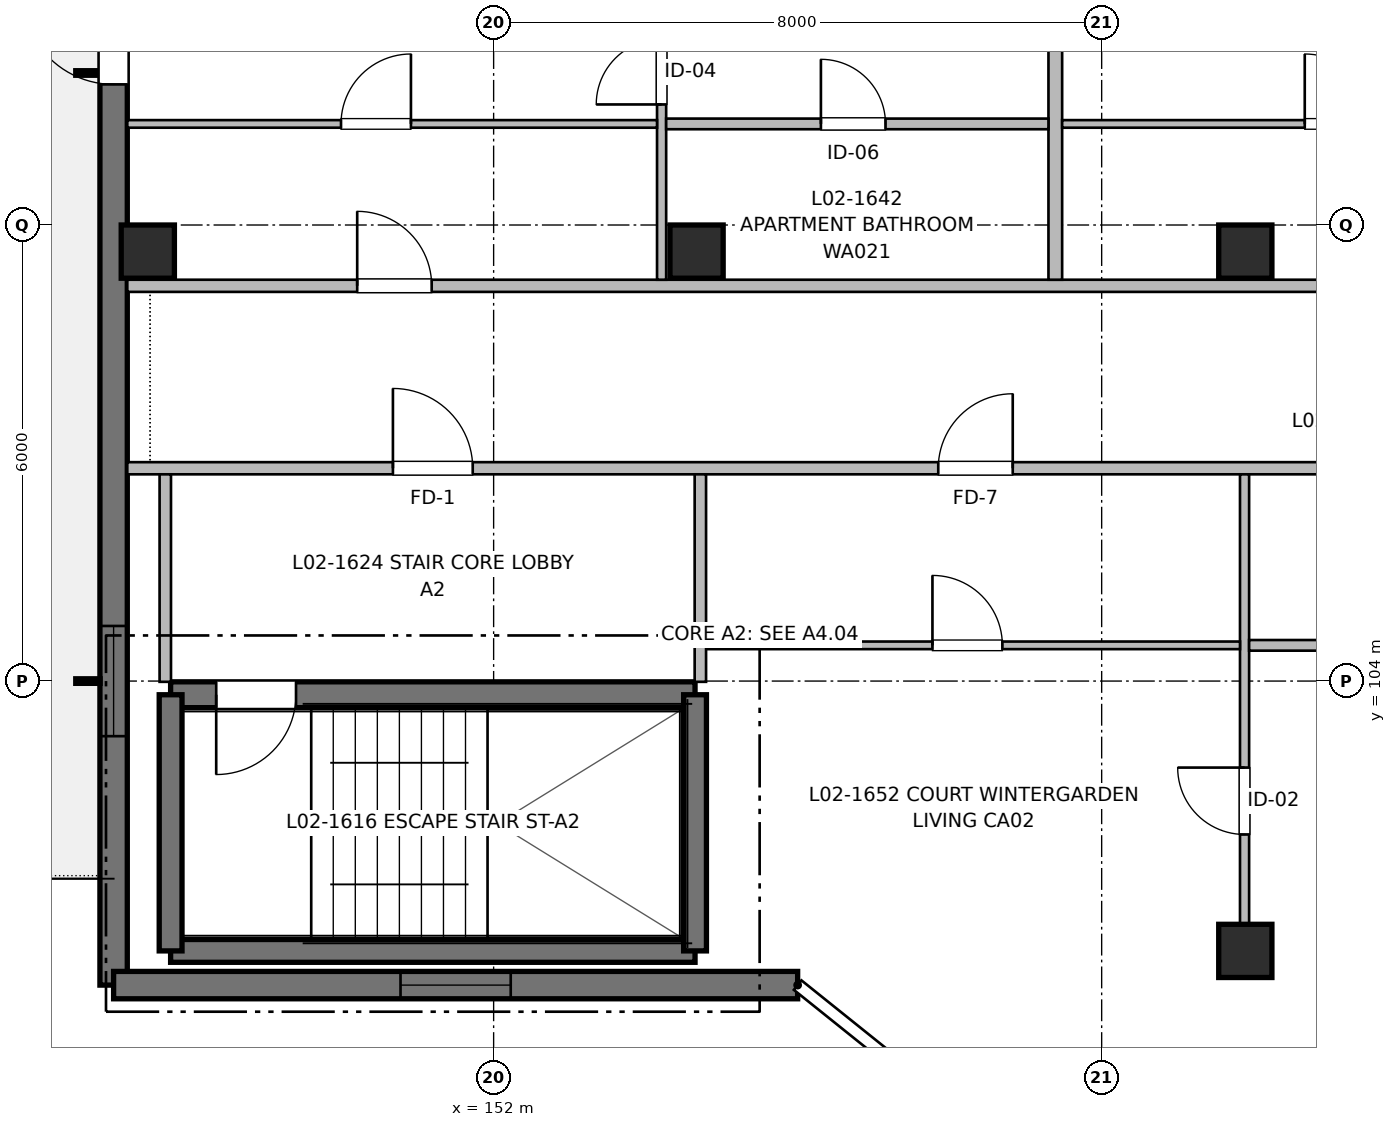
"""IFC4 building model, lengths in metres.
Left out: names, types, materials, properties, quantities, classifications, styles, units other than length and angle.
Written with IfcOpenShell. Run it as: python <this file> out.ifc"""

import sys

from ifc_helpers import new_model, si_unit, direction, frame, frame_2d, origin, origin_2d, place, context, subcontext, project, spatial, rectangle, extrude, element, fill, save


model = new_model("IFC4")
c1 = context("Model", 3, precision=1e-05, world=origin(), true_north=direction((0.0, 1.0)))
c2 = subcontext(c1, "Body", "Model", "MODEL_VIEW")
j1 = project(units=[si_unit("LENGTHUNIT", "METRE"), si_unit("PLANEANGLEUNIT", "RADIAN")], contexts=[c1])
p1 = place(None, origin())
s1 = spatial("IfcSite", under=j1, at=p1, CompositionType="ELEMENT")
p2 = place(p1, origin())
s2 = spatial("IfcBuilding", under=s1, at=p2, CompositionType="ELEMENT")
p3 = place(p2, frame((0.0, 0.0, 7.36)))
s3 = spatial("IfcBuildingStorey", under=s2, at=p3, CompositionType="ELEMENT", Elevation=7.36)
for number, where, z_axis, x_axis in (
    (1, (147.45, 109.65, 0.0), (0.0, 0.0, 1.0), (1.0, 0.0, 0.0)),
    (2, (154.67, 109.65, 0.0), (0.0, 0.0, 1.0), (1.0, 0.0, 0.0)),
    (3, (161.89, 100.45, 0.0), (0.0, 0.0, 1.0), (1.0, 0.0, 0.0)),
    (4, (161.89, 109.65, 0.0), (0.0, 0.0, 1.0), (1.0, 0.0, 0.0)),
):
    element("IfcColumn", number, at=place(p3, frame(where, z_axis=z_axis, x_axis=x_axis)), inside=s3, PredefinedType="COLUMN", context=c2, shape_type="SweptSolid", body=[
        extrude(rectangle(XDim=0.7, YDim=0.7, at=origin_2d()), origin(), (0.0, 0.0, 1.0), 3.2),
    ])
p4 = place(p3, frame((147.75, 100.45, 0.0), z_axis=(0.0, 0.0, 1.0), x_axis=(1.0, 0.0, 0.0)))
e5 = element("IfcWall", 5, at=p4, inside=s3, PredefinedType="SHEAR", context=c2, shape_type="SweptSolid", body=[
    extrude(rectangle(XDim=6.9, YDim=0.3, at=frame_2d((3.45, 0.0))), origin(), (0.0, 0.0, 1.0), 3.2),
])
p5 = place(p3, frame((154.65, 103.82, 0.0), z_axis=(0.0, 0.0, 1.0), x_axis=(-1.0, 0.0, 0.0)))
e6 = element("IfcWall", 6, at=p5, inside=s3, PredefinedType="SHEAR", context=c2, shape_type="SweptSolid", body=[
    extrude(rectangle(XDim=6.9, YDim=0.34, at=frame_2d((3.45, 0.0))), origin(), (0.0, 0.0, 1.0), 3.2),
])
p6 = place(p5, frame((5.25, 0.0, 0.0)))
e7 = element("IfcOpeningElement", 7, at=p6, cuts=e6, PredefinedType="OPENING", context=c2, shape_type="SweptSolid", body=[
    extrude(rectangle(XDim=1.05, YDim=2.15, at=frame_2d((0.525, 1.075))), frame((0.0, 0.18, 0.0), z_axis=(0.0, -1.0, 0.0), x_axis=(1.0, 0.0, 0.0)), (0.0, 0.0, 1.0), 0.36),
])
for number, where, z_axis, x_axis in (
    (8, (147.75, 103.82, 0.0), (0.0, 0.0, 1.0), (0.0, -1.0, 0.0)),
    (9, (154.65, 100.45, 0.0), (0.0, 0.0, 1.0), (0.0, 1.0, 0.0)),
):
    element("IfcWall", number, at=place(p3, frame(where, z_axis=z_axis, x_axis=x_axis)), inside=s3, PredefinedType="SHEAR", context=c2, shape_type="SweptSolid", body=[
        extrude(rectangle(XDim=3.37, YDim=0.3, at=frame_2d((1.685, 0.0))), origin(), (0.0, 0.0, 1.0), 3.2),
    ])
p7 = place(p3, frame((147.0, 100.0, 0.0), z_axis=(0.0, 0.0, 1.0), x_axis=(0.0, 1.0, 0.0)))
e10 = element("IfcWall", 10, at=p7, inside=s3, PredefinedType="SHEAR", context=c2, shape_type="SweptSolid", body=[
    extrude(rectangle(XDim=16.0, YDim=0.36, at=frame_2d((8.0, 0.0))), origin(), (0.0, 0.0, 1.0), 2.98),
])
p8 = place(p7, frame((3.275, 0.0, 0.77)))
e11 = element("IfcOpeningElement", 11, at=p8, cuts=e10, PredefinedType="OPENING", context=c2, shape_type="SweptSolid", body=[
    extrude(rectangle(XDim=1.45, YDim=1.45, at=frame_2d((0.725, 0.725))), frame((0.0, 0.19, 0.0), z_axis=(0.0, -1.0, 0.0), x_axis=(1.0, 0.0, 0.0)), (0.0, 0.0, 1.0), 0.38),
])
p9 = place(p7, frame((11.85, 0.0, 0.0)))
e12 = element("IfcOpeningElement", 12, at=p9, cuts=e10, PredefinedType="OPENING", context=c2, shape_type="SweptSolid", body=[
    extrude(rectangle(XDim=1.2, YDim=2.2, at=frame_2d((0.6, 1.1))), frame((0.0, 0.19, 0.0), z_axis=(0.0, -1.0, 0.0), x_axis=(1.0, 0.0, 0.0)), (0.0, 0.0, 1.0), 0.38),
])
p10 = place(p7, frame((13.3, 0.0, 0.82)))
e13 = element("IfcOpeningElement", 13, at=p10, cuts=e10, PredefinedType="OPENING", context=c2, shape_type="SweptSolid", body=[
    extrude(rectangle(XDim=1.5, YDim=1.4, at=frame_2d((0.75, 0.7))), frame((0.0, 0.19, 0.0), z_axis=(0.0, -1.0, 0.0), x_axis=(1.0, 0.0, 0.0)), (0.0, 0.0, 1.0), 0.38),
])
p11 = place(p3, frame((156.0, 100.0, 0.0), z_axis=(0.0, 0.0, 1.0), x_axis=(-1.0, 0.0, 0.0)))
e14 = element("IfcWall", 14, at=p11, inside=s3, PredefinedType="SHEAR", context=c2, shape_type="SweptSolid", body=[
    extrude(rectangle(XDim=9.0, YDim=0.36, at=frame_2d((4.5, 0.0))), origin(), (0.0, 0.0, 1.0), 2.98),
])
p12 = place(p11, frame((3.775, 0.0, 0.77)))
e15 = element("IfcOpeningElement", 15, at=p12, cuts=e14, PredefinedType="OPENING", context=c2, shape_type="SweptSolid", body=[
    extrude(rectangle(XDim=1.45, YDim=1.45, at=frame_2d((0.725, 0.725))), frame((0.0, 0.19, 0.0), z_axis=(0.0, -1.0, 0.0), x_axis=(1.0, 0.0, 0.0)), (0.0, 0.0, 1.0), 0.38),
])
p13 = place(p3, frame((147.18, 106.8, 0.0), z_axis=(0.0, 0.0, 1.0), x_axis=(1.0, 0.0, 0.0)))
e16 = element("IfcWall", 16, at=p13, inside=s3, PredefinedType="PARTITIONING", context=c2, shape_type="SweptSolid", body=[
    extrude(rectangle(XDim=27.62, YDim=0.16, at=frame_2d((13.81, 0.0))), origin(), (0.0, 0.0, 1.0), 2.935),
])
p14 = place(p13, frame((3.495, 0.0, 0.0)))
e17 = element("IfcOpeningElement", 17, at=p14, cuts=e16, PredefinedType="OPENING", context=c2, shape_type="SweptSolid", body=[
    extrude(rectangle(XDim=1.05, YDim=2.15, at=frame_2d((0.525, 1.075))), frame((0.0, 0.09, 0.0), z_axis=(0.0, -1.0, 0.0), x_axis=(1.0, 0.0, 0.0)), (0.0, 0.0, 1.0), 0.18),
])
p15 = place(p13, frame((10.67, 0.0, 0.0)))
e18 = element("IfcOpeningElement", 18, at=p15, cuts=e16, PredefinedType="OPENING", context=c2, shape_type="SweptSolid", body=[
    extrude(rectangle(XDim=0.98, YDim=2.15, at=frame_2d((0.49, 1.075))), frame((0.0, 0.09, 0.0), z_axis=(0.0, -1.0, 0.0), x_axis=(1.0, 0.0, 0.0)), (0.0, 0.0, 1.0), 0.18),
])
p16 = place(p3, frame((147.18, 109.2, 0.0), z_axis=(0.0, 0.0, 1.0), x_axis=(1.0, 0.0, 0.0)))
e19 = element("IfcWall", 19, at=p16, inside=s3, PredefinedType="PARTITIONING", context=c2, shape_type="SweptSolid", body=[
    extrude(rectangle(XDim=36.64, YDim=0.16, at=frame_2d((18.32, 0.0))), origin(), (0.0, 0.0, 1.0), 2.935),
])
p17 = place(p16, frame((3.025, 0.0, 0.0)))
e20 = element("IfcOpeningElement", 20, at=p17, cuts=e19, PredefinedType="OPENING", context=c2, shape_type="SweptSolid", body=[
    extrude(rectangle(XDim=0.98, YDim=2.15, at=frame_2d((0.49, 1.075))), frame((0.0, 0.09, 0.0), z_axis=(0.0, -1.0, 0.0), x_axis=(1.0, 0.0, 0.0)), (0.0, 0.0, 1.0), 0.18),
])
p18 = place(p16, frame((15.7, 0.0, 0.0)))
e21 = element("IfcOpeningElement", 21, at=p18, cuts=e19, PredefinedType="OPENING", context=c2, shape_type="SweptSolid", body=[
    extrude(rectangle(XDim=0.98, YDim=2.15, at=frame_2d((0.49, 1.075))), frame((0.0, 0.09, 0.0), z_axis=(0.0, -1.0, 0.0), x_axis=(1.0, 0.0, 0.0)), (0.0, 0.0, 1.0), 0.18),
])
p19 = place(p16, frame((27.145, 0.0, 0.0)))
e22 = element("IfcOpeningElement", 22, at=p19, cuts=e19, PredefinedType="OPENING", context=c2, shape_type="SweptSolid", body=[
    extrude(rectangle(XDim=0.98, YDim=2.15, at=frame_2d((0.49, 1.075))), frame((0.0, 0.09, 0.0), z_axis=(0.0, -1.0, 0.0), x_axis=(1.0, 0.0, 0.0)), (0.0, 0.0, 1.0), 0.18),
])
for number, where, z_axis, x_axis in (
    (23, (147.68, 103.99, 0.0), (0.0, 0.0, 1.0), (0.0, 1.0, 0.0)),
    (24, (154.72, 103.99, 0.0), (0.0, 0.0, 1.0), (0.0, 1.0, 0.0)),
):
    element("IfcWall", number, at=place(p3, frame(where, z_axis=z_axis, x_axis=x_axis)), inside=s3, PredefinedType="PARTITIONING", context=c2, shape_type="SweptSolid", body=[
        extrude(rectangle(XDim=2.73, YDim=0.15, at=frame_2d((1.365, 0.0))), origin(), (0.0, 0.0, 1.0), 2.935),
    ])
p20 = place(p3, frame((159.39, 109.28, 0.0), z_axis=(0.0, 0.0, 1.0), x_axis=(0.0, 1.0, 0.0)))
e25 = element("IfcWall", 25, at=p20, inside=s3, PredefinedType="PARTITIONING", context=c2, shape_type="SweptSolid", body=[
    extrude(rectangle(XDim=6.6, YDim=0.18, at=frame_2d((3.3, 0.0))), origin(), (0.0, 0.0, 1.0), 2.935),
])
p21 = place(p3, frame((154.21, 109.28, 0.0), z_axis=(0.0, 0.0, 1.0), x_axis=(0.0, 1.0, 0.0)))
e26 = element("IfcWall", 26, at=p21, inside=s3, PredefinedType="PARTITIONING", context=c2, shape_type="SweptSolid", body=[
    extrude(rectangle(XDim=6.6, YDim=0.12, at=frame_2d((3.3, 0.0))), origin(), (0.0, 0.0, 1.0), 2.935),
])
p22 = place(p21, frame((2.306, 0.0, 0.0)))
e27 = element("IfcOpeningElement", 27, at=p22, cuts=e26, PredefinedType="OPENING", context=c2, shape_type="SweptSolid", body=[
    extrude(rectangle(XDim=0.86, YDim=2.1, at=frame_2d((0.43, 1.05))), frame((0.0, 0.07, 0.0), z_axis=(0.0, -1.0, 0.0), x_axis=(1.0, 0.0, 0.0)), (0.0, 0.0, 1.0), 0.14),
])
p23 = place(p21, frame((4.097, 0.0, 0.0)))
e28 = element("IfcOpeningElement", 28, at=p23, cuts=e26, PredefinedType="OPENING", context=c2, shape_type="SweptSolid", body=[
    extrude(rectangle(XDim=0.9, YDim=2.1, at=frame_2d((0.45, 1.05))), frame((0.0, 0.07, 0.0), z_axis=(0.0, -1.0, 0.0), x_axis=(1.0, 0.0, 0.0)), (0.0, 0.0, 1.0), 0.14),
])
p24 = place(p3, frame((154.27, 111.33, 0.0), z_axis=(0.0, 0.0, 1.0), x_axis=(1.0, 0.0, 0.0)))
e29 = element("IfcWall", 29, at=p24, inside=s3, PredefinedType="PARTITIONING", context=c2, shape_type="SweptSolid", body=[
    extrude(rectangle(XDim=5.03, YDim=0.14, at=frame_2d((2.515, 0.0))), origin(), (0.0, 0.0, 1.0), 2.935),
])
p25 = place(p24, frame((2.036, 0.0, 0.0)))
e30 = element("IfcOpeningElement", 30, at=p25, cuts=e29, PredefinedType="OPENING", context=c2, shape_type="SweptSolid", body=[
    extrude(rectangle(XDim=0.85, YDim=2.05, at=frame_2d((0.425, 1.025))), frame((0.0, 0.08, 0.0), z_axis=(0.0, -1.0, 0.0), x_axis=(1.0, 0.0, 0.0)), (0.0, 0.0, 1.0), 0.16),
])
p26 = place(p3, frame((147.18, 111.33, 0.0), z_axis=(0.0, 0.0, 1.0), x_axis=(1.0, 0.0, 0.0)))
e31 = element("IfcWall", 31, at=p26, inside=s3, PredefinedType="PARTITIONING", context=c2, shape_type="SweptSolid", body=[
    extrude(rectangle(XDim=6.97, YDim=0.1, at=frame_2d((3.485, 0.0))), origin(), (0.0, 0.0, 1.0), 2.935),
])
p27 = place(p26, frame((2.812, 0.0, 0.0)))
e32 = element("IfcOpeningElement", 32, at=p27, cuts=e31, PredefinedType="OPENING", context=c2, shape_type="SweptSolid", body=[
    extrude(rectangle(XDim=0.92, YDim=2.1, at=frame_2d((0.46, 1.05))), frame((0.0, 0.06, 0.0), z_axis=(0.0, -1.0, 0.0), x_axis=(1.0, 0.0, 0.0)), (0.0, 0.0, 1.0), 0.12),
])
p28 = place(p3, frame((159.48, 111.33, 0.0), z_axis=(0.0, 0.0, 1.0), x_axis=(1.0, 0.0, 0.0)))
e33 = element("IfcWall", 33, at=p28, inside=s3, PredefinedType="PARTITIONING", context=c2, shape_type="SweptSolid", body=[
    extrude(rectangle(XDim=6.92, YDim=0.1, at=frame_2d((3.46, 0.0))), origin(), (0.0, 0.0, 1.0), 2.935),
])
p29 = place(p28, frame((3.192, 0.0, 0.0)))
e34 = element("IfcOpeningElement", 34, at=p29, cuts=e33, PredefinedType="OPENING", context=c2, shape_type="SweptSolid", body=[
    extrude(rectangle(XDim=0.92, YDim=2.1, at=frame_2d((0.46, 1.05))), frame((0.0, 0.06, 0.0), z_axis=(0.0, -1.0, 0.0), x_axis=(1.0, 0.0, 0.0)), (0.0, 0.0, 1.0), 0.12),
])
p30 = place(p3, frame((161.88, 100.18, 0.0), z_axis=(0.0, 0.0, 1.0), x_axis=(0.0, 1.0, 0.0)))
e35 = element("IfcWall", 35, at=p30, inside=s3, PredefinedType="PARTITIONING", context=c2, shape_type="SweptSolid", body=[
    extrude(rectangle(XDim=6.54, YDim=0.12, at=frame_2d((3.27, 0.0))), origin(), (0.0, 0.0, 1.0), 2.68),
])
p31 = place(p30, frame((1.802, 0.0, 0.0)))
e36 = element("IfcOpeningElement", 36, at=p31, cuts=e35, PredefinedType="OPENING", context=c2, shape_type="SweptSolid", body=[
    extrude(rectangle(XDim=0.88, YDim=2.1, at=frame_2d((0.44, 1.05))), frame((0.0, 0.07, 0.0), z_axis=(0.0, -1.0, 0.0), x_axis=(1.0, 0.0, 0.0)), (0.0, 0.0, 1.0), 0.14),
])
p32 = place(p3, frame((161.94, 104.47, 0.0), z_axis=(0.0, 0.0, 1.0), x_axis=(1.0, 0.0, 0.0)))
e37 = element("IfcWall", 37, at=p32, inside=s3, PredefinedType="PARTITIONING", context=c2, shape_type="SweptSolid", body=[
    extrude(rectangle(XDim=5.97, YDim=0.14, at=frame_2d((2.985, 0.0))), origin(), (0.0, 0.0, 1.0), 2.935),
])
p33 = place(p32, frame((2.533, 0.0, 0.0)))
e38 = element("IfcOpeningElement", 38, at=p33, cuts=e37, PredefinedType="OPENING", context=c2, shape_type="SweptSolid", body=[
    extrude(rectangle(XDim=0.86, YDim=2.1, at=frame_2d((0.43, 1.05))), frame((0.0, 0.08, 0.0), z_axis=(0.0, -1.0, 0.0), x_axis=(1.0, 0.0, 0.0)), (0.0, 0.0, 1.0), 0.16),
])
p34 = place(p3, frame((154.8, 104.47, 0.0), z_axis=(0.0, 0.0, 1.0), x_axis=(1.0, 0.0, 0.0)))
e39 = element("IfcWall", 39, at=p34, inside=s3, PredefinedType="PARTITIONING", context=c2, shape_type="SweptSolid", body=[
    extrude(rectangle(XDim=7.02, YDim=0.1, at=frame_2d((3.51, 0.0))), origin(), (0.0, 0.0, 1.0), 2.935),
])
p35 = place(p34, frame((2.974, 0.0, 0.0)))
e40 = element("IfcOpeningElement", 40, at=p35, cuts=e39, PredefinedType="OPENING", context=c2, shape_type="SweptSolid", body=[
    extrude(rectangle(XDim=0.92, YDim=2.1, at=frame_2d((0.46, 1.05))), frame((0.0, 0.06, 0.0), z_axis=(0.0, -1.0, 0.0), x_axis=(1.0, 0.0, 0.0)), (0.0, 0.0, 1.0), 0.12),
])
p36 = place(p6, origin())
e41 = element("IfcDoor", 41, at=p36, inside=s3, OperationType="SINGLE_SWING_RIGHT", PredefinedType="DOOR", context=c2, shape_type="SweptSolid", body=[
    extrude(rectangle(XDim=1.05, YDim=2.15, at=frame_2d((0.525, 1.075))), frame((0.0, 0.025, 0.0), z_axis=(0.0, -1.0, 0.0), x_axis=(1.0, 0.0, 0.0)), (0.0, 0.0, 1.0), 0.05),
])
fill(e7, e41)
p37 = place(p8, origin())
e42 = element("IfcWindow", 42, at=p37, inside=s3, PartitioningType="SINGLE_PANEL", PredefinedType="WINDOW", context=c2, shape_type="SweptSolid", body=[
    extrude(rectangle(XDim=1.45, YDim=1.45, at=frame_2d((0.725, 0.725))), frame((0.0, 0.03, 0.0), z_axis=(0.0, -1.0, 0.0), x_axis=(1.0, 0.0, 0.0)), (0.0, 0.0, 1.0), 0.06),
])
fill(e11, e42)
p38 = place(p9, origin())
e43 = element("IfcDoor", 43, at=p38, inside=s3, OperationType="SINGLE_SWING_RIGHT", PredefinedType="DOOR", context=c2, shape_type="SweptSolid", body=[
    extrude(rectangle(XDim=1.2, YDim=2.2, at=frame_2d((0.6, 1.1))), frame((0.0, 0.025, 0.0), z_axis=(0.0, -1.0, 0.0), x_axis=(1.0, 0.0, 0.0)), (0.0, 0.0, 1.0), 0.05),
])
fill(e12, e43)
p39 = place(p12, origin())
e44 = element("IfcWindow", 44, at=p39, inside=s3, PartitioningType="SINGLE_PANEL", PredefinedType="WINDOW", context=c2, shape_type="SweptSolid", body=[
    extrude(rectangle(XDim=1.45, YDim=1.45, at=frame_2d((0.725, 0.725))), frame((0.0, 0.03, 0.0), z_axis=(0.0, -1.0, 0.0), x_axis=(1.0, 0.0, 0.0)), (0.0, 0.0, 1.0), 0.06),
])
fill(e15, e44)
p40 = place(p14, origin())
e45 = element("IfcDoor", 45, at=p40, inside=s3, OperationType="SINGLE_SWING_LEFT", PredefinedType="DOOR", context=c2, shape_type="SweptSolid", body=[
    extrude(rectangle(XDim=1.05, YDim=2.15, at=frame_2d((0.525, 1.075))), frame((0.0, 0.025, 0.0), z_axis=(0.0, -1.0, 0.0), x_axis=(1.0, 0.0, 0.0)), (0.0, 0.0, 1.0), 0.05),
])
fill(e17, e45)
p41 = place(p17, origin())
e46 = element("IfcDoor", 46, at=p41, inside=s3, OperationType="SINGLE_SWING_LEFT", PredefinedType="DOOR", context=c2, shape_type="SweptSolid", body=[
    extrude(rectangle(XDim=0.98, YDim=2.15, at=frame_2d((0.49, 1.075))), frame((0.0, 0.025, 0.0), z_axis=(0.0, -1.0, 0.0), x_axis=(1.0, 0.0, 0.0)), (0.0, 0.0, 1.0), 0.05),
])
fill(e20, e46)
p42 = place(p27, origin())
e47 = element("IfcDoor", 47, at=p42, inside=s3, OperationType="SINGLE_SWING_RIGHT", PredefinedType="DOOR", context=c2, shape_type="SweptSolid", body=[
    extrude(rectangle(XDim=0.92, YDim=2.1, at=frame_2d((0.46, 1.05))), frame((0.0, 0.025, 0.0), z_axis=(0.0, -1.0, 0.0), x_axis=(1.0, 0.0, 0.0)), (0.0, 0.0, 1.0), 0.05),
])
fill(e32, e47)
p43 = place(p22, origin())
e48 = element("IfcDoor", 48, at=p43, inside=s3, OperationType="SINGLE_SWING_LEFT", PredefinedType="DOOR", context=c2, shape_type="SweptSolid", body=[
    extrude(rectangle(XDim=0.86, YDim=2.1, at=frame_2d((0.43, 1.05))), frame((0.0, 0.025, 0.0), z_axis=(0.0, -1.0, 0.0), x_axis=(1.0, 0.0, 0.0)), (0.0, 0.0, 1.0), 0.05),
])
fill(e27, e48)
p44 = place(p25, origin())
e49 = element("IfcDoor", 49, at=p44, inside=s3, OperationType="SINGLE_SWING_LEFT", PredefinedType="DOOR", context=c2, shape_type="SweptSolid", body=[
    extrude(rectangle(XDim=0.85, YDim=2.05, at=frame_2d((0.425, 1.025))), frame((0.0, 0.025, 0.0), z_axis=(0.0, -1.0, 0.0), x_axis=(1.0, 0.0, 0.0)), (0.0, 0.0, 1.0), 0.05),
])
fill(e30, e49)
p45 = place(p29, origin())
e50 = element("IfcDoor", 50, at=p45, inside=s3, OperationType="SINGLE_SWING_LEFT", PredefinedType="DOOR", context=c2, shape_type="SweptSolid", body=[
    extrude(rectangle(XDim=0.92, YDim=2.1, at=frame_2d((0.46, 1.05))), frame((0.0, 0.025, 0.0), z_axis=(0.0, -1.0, 0.0), x_axis=(1.0, 0.0, 0.0)), (0.0, 0.0, 1.0), 0.05),
])
fill(e34, e50)
p46 = place(p15, origin())
e51 = element("IfcDoor", 51, at=p46, inside=s3, OperationType="SINGLE_SWING_RIGHT", PredefinedType="DOOR", context=c2, shape_type="SweptSolid", body=[
    extrude(rectangle(XDim=0.98, YDim=2.15, at=frame_2d((0.49, 1.075))), frame((0.0, 0.025, 0.0), z_axis=(0.0, -1.0, 0.0), x_axis=(1.0, 0.0, 0.0)), (0.0, 0.0, 1.0), 0.05),
])
fill(e18, e51)
p47 = place(p35, origin())
e52 = element("IfcDoor", 52, at=p47, inside=s3, OperationType="SINGLE_SWING_LEFT", PredefinedType="DOOR", context=c2, shape_type="SweptSolid", body=[
    extrude(rectangle(XDim=0.92, YDim=2.1, at=frame_2d((0.46, 1.05))), frame((0.0, 0.025, 0.0), z_axis=(0.0, -1.0, 0.0), x_axis=(1.0, 0.0, 0.0)), (0.0, 0.0, 1.0), 0.05),
])
fill(e40, e52)
p48 = place(p31, origin())
e53 = element("IfcDoor", 53, at=p48, inside=s3, OperationType="SINGLE_SWING_RIGHT", PredefinedType="DOOR", context=c2, shape_type="SweptSolid", body=[
    extrude(rectangle(XDim=0.88, YDim=2.1, at=frame_2d((0.44, 1.05))), frame((0.0, 0.025, 0.0), z_axis=(0.0, -1.0, 0.0), x_axis=(1.0, 0.0, 0.0)), (0.0, 0.0, 1.0), 0.05),
])
fill(e36, e53)
save(model, sys.argv[1])
